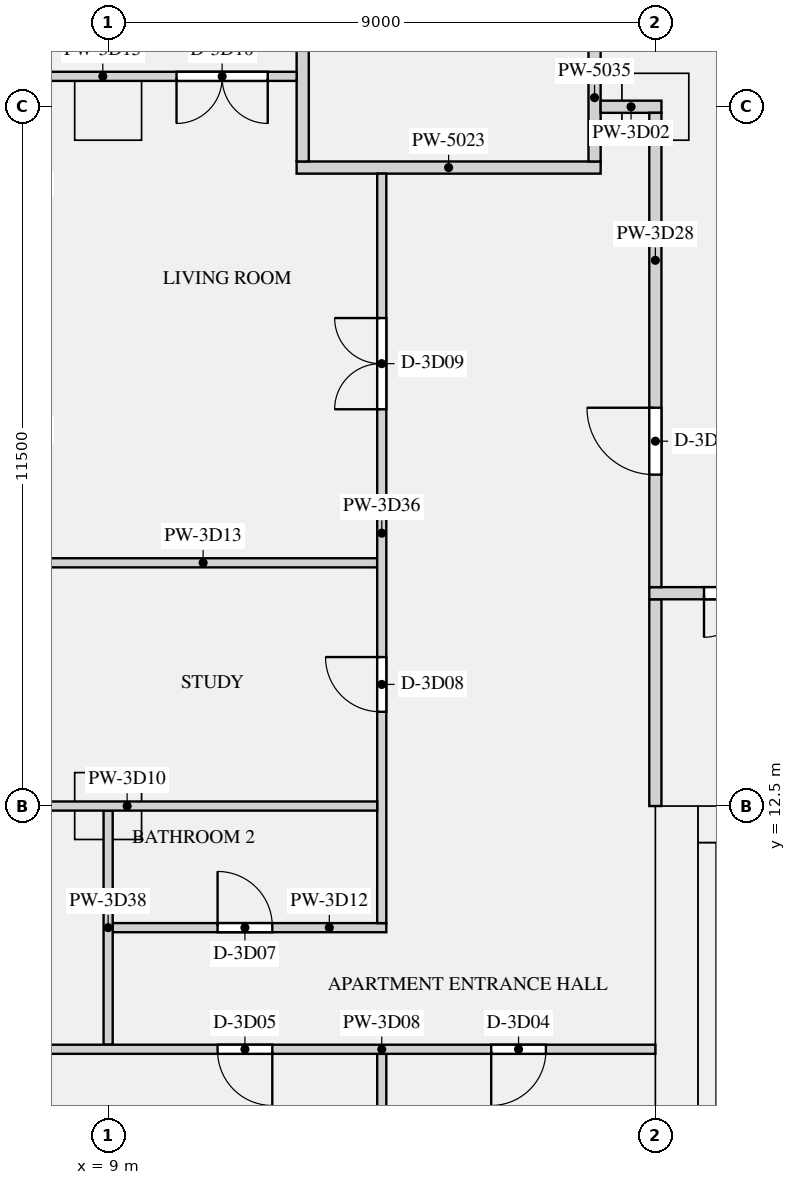
"""IFC4 building model, lengths in metres.
Left out: names, types, materials, properties, quantities, classifications, styles, units other than length and angle.
Written with IfcOpenShell. Run it as: python <this file> out.ifc"""

import sys

from ifc_helpers import new_model, si_unit, direction, frame, frame_2d, origin, origin_2d, place, context, subcontext, project, spatial, rectangle, extrude, element, fill, save


model = new_model("IFC4")
c1 = context("Model", 3, precision=1e-05, world=origin(), true_north=direction((0.0, 1.0)))
c2 = subcontext(c1, "Body", "Model", "MODEL_VIEW")
j1 = project(units=[si_unit("LENGTHUNIT", "METRE"), si_unit("PLANEANGLEUNIT", "RADIAN")], contexts=[c1])
p1 = place(None, origin())
s1 = spatial("IfcSite", under=j1, at=p1, CompositionType="ELEMENT")
p2 = place(p1, origin())
s2 = spatial("IfcBuilding", under=s1, at=p2, CompositionType="ELEMENT")
p3 = place(p2, frame((0.0, 0.0, 166.5)))
s3 = spatial("IfcBuildingStorey", under=s2, at=p3, CompositionType="ELEMENT", Elevation=166.5)
for number, where, z_axis, x_axis in (
    (1, (9.0, 24.0, 0.0), (0.0, 0.0, 1.0), (1.0, 0.0, 0.0)),
    (2, (18.0, 24.0, 0.0), (0.0, 0.0, 1.0), (1.0, 0.0, 0.0)),
    (3, (9.0, 12.5, 0.0), (0.0, 0.0, 1.0), (1.0, 0.0, 0.0)),
):
    element("IfcColumn", number, at=place(p3, frame(where, z_axis=z_axis, x_axis=x_axis)), inside=s3, PredefinedType="COLUMN", context=c2, shape_type="SweptSolid", body=[
        extrude(rectangle(XDim=1.1, YDim=1.1, at=origin_2d()), origin(), (0.0, 0.0, 1.0), 3.15),
    ])
p4 = place(p3, frame((18.35, 0.0, 0.0), z_axis=(0.0, 0.0, 1.0), x_axis=(0.0, 1.0, 0.0)))
e4 = element("IfcWall", 4, at=p4, inside=s3, PredefinedType="SHEAR", context=c2, shape_type="SweptSolid", body=[
    extrude(rectangle(XDim=12.5, YDim=0.7, at=frame_2d((6.25, 0.0))), origin(), (0.0, 0.0, 1.0), 3.15),
])
p5 = place(p3, frame((18.7, 12.2, 0.0), z_axis=(0.0, 0.0, 1.0), x_axis=(1.0, 0.0, 0.0)))
e5 = element("IfcWall", 5, at=p5, inside=s3, PredefinedType="SHEAR", context=c2, shape_type="SweptSolid", body=[
    extrude(rectangle(XDim=34.6, YDim=0.6, at=frame_2d((17.3, 0.0))), origin(), (0.0, 0.0, 1.0), 3.15),
])
p6 = place(p5, frame((24.475, 0.0, 0.0)))
e6 = element("IfcOpeningElement", 6, at=p6, cuts=e5, PredefinedType="OPENING", context=c2, shape_type="SweptSolid", body=[
    extrude(rectangle(XDim=1.1, YDim=2.1, at=frame_2d((0.55, 1.05))), frame((0.0, 0.31, 0.0), z_axis=(0.0, -1.0, 0.0), x_axis=(1.0, 0.0, 0.0)), (0.0, 0.0, 1.0), 0.62),
])
p7 = place(p5, frame((26.725, 0.0, 0.0)))
e7 = element("IfcOpeningElement", 7, at=p7, cuts=e5, PredefinedType="OPENING", context=c2, shape_type="SweptSolid", body=[
    extrude(rectangle(XDim=1.1, YDim=2.1, at=frame_2d((0.55, 1.05))), frame((0.0, 0.31, 0.0), z_axis=(0.0, -1.0, 0.0), x_axis=(1.0, 0.0, 0.0)), (0.0, 0.0, 1.0), 0.62),
])
p8 = place(p5, frame((28.975, 0.0, 0.0)))
e8 = element("IfcOpeningElement", 8, at=p8, cuts=e5, PredefinedType="OPENING", context=c2, shape_type="SweptSolid", body=[
    extrude(rectangle(XDim=1.1, YDim=2.1, at=frame_2d((0.55, 1.05))), frame((0.0, 0.31, 0.0), z_axis=(0.0, -1.0, 0.0), x_axis=(1.0, 0.0, 0.0)), (0.0, 0.0, 1.0), 0.62),
])
p9 = place(p5, frame((8.85, 0.0, 0.0)))
e9 = element("IfcOpeningElement", 9, at=p9, cuts=e5, PredefinedType="OPENING", context=c2, shape_type="SweptSolid", body=[
    extrude(rectangle(XDim=0.9, YDim=2.1, at=frame_2d((0.45, 1.05))), frame((0.0, 0.31, 0.0), z_axis=(0.0, -1.0, 0.0), x_axis=(1.0, 0.0, 0.0)), (0.0, 0.0, 1.0), 0.62),
])
p10 = place(p5, frame((1.45, 0.0, 0.0)))
e10 = element("IfcOpeningElement", 10, at=p10, cuts=e5, PredefinedType="OPENING", context=c2, shape_type="SweptSolid", body=[
    extrude(rectangle(XDim=1.2, YDim=2.1, at=frame_2d((0.6, 1.05))), frame((0.0, 0.31, 0.0), z_axis=(0.0, -1.0, 0.0), x_axis=(1.0, 0.0, 0.0)), (0.0, 0.0, 1.0), 0.62),
])
p11 = place(p5, frame((31.95, 0.0, 0.0)))
e11 = element("IfcOpeningElement", 11, at=p11, cuts=e5, PredefinedType="OPENING", context=c2, shape_type="SweptSolid", body=[
    extrude(rectangle(XDim=1.2, YDim=2.1, at=frame_2d((0.6, 1.05))), frame((0.0, 0.31, 0.0), z_axis=(0.0, -1.0, 0.0), x_axis=(1.0, 0.0, 0.0)), (0.0, 0.0, 1.0), 0.62),
])
p12 = place(p3, frame((18.85, 1.0, 0.0), z_axis=(0.0, 0.0, 1.0), x_axis=(0.0, 1.0, 0.0)))
e12 = element("IfcWall", 12, at=p12, inside=s3, PredefinedType="SHEAR", context=c2, shape_type="SweptSolid", body=[
    extrude(rectangle(XDim=10.9, YDim=0.3, at=frame_2d((5.45, 0.0))), origin(), (0.0, 0.0, 1.0), 3.15),
])
p13 = place(p3, frame((12.1, 23.0, 0.0), z_axis=(0.0, 0.0, 1.0), x_axis=(1.0, 0.0, 0.0)))
e13 = element("IfcWall", 13, at=p13, inside=s3, PredefinedType="PARTITIONING", context=c2, shape_type="SweptSolid", body=[
    extrude(rectangle(XDim=5.0, YDim=0.2, at=frame_2d((2.5, 0.0))), origin(), (0.0, 0.0, 1.0), 2.83),
])
p14 = place(p3, frame((18.0, 12.5, 0.0), z_axis=(0.0, 0.0, 1.0), x_axis=(0.0, 1.0, 0.0)))
e14 = element("IfcWall", 14, at=p14, inside=s3, PredefinedType="PARTITIONING", context=c2, shape_type="SweptSolid", body=[
    extrude(rectangle(XDim=3.4, YDim=0.2, at=frame_2d((1.7, 0.0))), origin(), (0.0, 0.0, 1.0), 2.83),
])
p15 = place(p3, frame((12.2, 23.1, 0.0), z_axis=(0.0, 0.0, 1.0), x_axis=(0.0, 1.0, 0.0)))
e15 = element("IfcWall", 15, at=p15, inside=s3, PredefinedType="PARTITIONING", context=c2, shape_type="SweptSolid", body=[
    extrude(rectangle(XDim=3.9, YDim=0.2, at=frame_2d((1.95, 0.0))), origin(), (0.0, 0.0, 1.0), 2.83),
])
p16 = place(p3, frame((17.0, 23.1, 0.0), z_axis=(0.0, 0.0, 1.0), x_axis=(0.0, 1.0, 0.0)))
e16 = element("IfcWall", 16, at=p16, inside=s3, PredefinedType="PARTITIONING", context=c2, shape_type="SweptSolid", body=[
    extrude(rectangle(XDim=3.8, YDim=0.2, at=frame_2d((1.9, 0.0))), origin(), (0.0, 0.0, 1.0), 2.83),
])
p17 = place(p16, frame((2.1, 0.0, 0.0)))
e17 = element("IfcOpeningElement", 17, at=p17, cuts=e16, PredefinedType="OPENING", context=c2, shape_type="SweptSolid", body=[
    extrude(rectangle(XDim=1.2, YDim=2.1, at=frame_2d((0.6, 1.05))), frame((0.0, 0.11, 0.0), z_axis=(0.0, -1.0, 0.0), x_axis=(1.0, 0.0, 0.0)), (0.0, 0.0, 1.0), 0.22),
])
p18 = place(p3, frame((17.1, 24.0, 0.0), z_axis=(0.0, 0.0, 1.0), x_axis=(1.0, 0.0, 0.0)))
e18 = element("IfcWall", 18, at=p18, inside=s3, PredefinedType="PARTITIONING", context=c2, shape_type="SweptSolid", body=[
    extrude(rectangle(XDim=1.0, YDim=0.2, at=frame_2d((0.5, 0.0))), origin(), (0.0, 0.0, 1.0), 2.83),
])
p19 = place(p3, frame((5.2, 8.5, 0.0), z_axis=(0.0, 0.0, 1.0), x_axis=(1.0, 0.0, 0.0)))
e19 = element("IfcWall", 19, at=p19, inside=s3, PredefinedType="PARTITIONING", context=c2, shape_type="SweptSolid", body=[
    extrude(rectangle(XDim=12.8, YDim=0.15, at=frame_2d((6.4, 0.0))), origin(), (0.0, 0.0, 1.0), 2.83),
])
p20 = place(p19, frame((10.1, 0.0, 0.0)))
e20 = element("IfcOpeningElement", 20, at=p20, cuts=e19, PredefinedType="OPENING", context=c2, shape_type="SweptSolid", body=[
    extrude(rectangle(XDim=0.9, YDim=2.1, at=frame_2d((0.45, 1.05))), frame((0.0, 0.085, 0.0), z_axis=(0.0, -1.0, 0.0), x_axis=(1.0, 0.0, 0.0)), (0.0, 0.0, 1.0), 0.17),
])
p21 = place(p19, frame((5.6, 0.0, 0.0)))
e21 = element("IfcOpeningElement", 21, at=p21, cuts=e19, PredefinedType="OPENING", context=c2, shape_type="SweptSolid", body=[
    extrude(rectangle(XDim=0.9, YDim=2.1, at=frame_2d((0.45, 1.05))), frame((0.0, 0.085, 0.0), z_axis=(0.0, -1.0, 0.0), x_axis=(1.0, 0.0, 0.0)), (0.0, 0.0, 1.0), 0.17),
])
p22 = place(p19, frame((1.375, 0.0, 0.0)))
e22 = element("IfcOpeningElement", 22, at=p22, cuts=e19, PredefinedType="OPENING", context=c2, shape_type="SweptSolid", body=[
    extrude(rectangle(XDim=0.9, YDim=2.1, at=frame_2d((0.45, 1.05))), frame((0.0, 0.085, 0.0), z_axis=(0.0, -1.0, 0.0), x_axis=(1.0, 0.0, 0.0)), (0.0, 0.0, 1.0), 0.17),
])
p23 = place(p3, frame((5.2, 12.5, 0.0), z_axis=(0.0, 0.0, 1.0), x_axis=(1.0, 0.0, 0.0)))
e23 = element("IfcWall", 23, at=p23, inside=s3, PredefinedType="PARTITIONING", context=c2, shape_type="SweptSolid", body=[
    extrude(rectangle(XDim=8.225, YDim=0.15, at=frame_2d((4.113, 0.0))), origin(), (0.0, 0.0, 1.0), 2.83),
])
p24 = place(p3, frame((9.075, 10.5, 0.0), z_axis=(0.0, 0.0, 1.0), x_axis=(1.0, 0.0, 0.0)))
e24 = element("IfcWall", 24, at=p24, inside=s3, PredefinedType="PARTITIONING", context=c2, shape_type="SweptSolid", body=[
    extrude(rectangle(XDim=4.5, YDim=0.15, at=frame_2d((2.25, 0.0))), origin(), (0.0, 0.0, 1.0), 2.83),
])
p25 = place(p24, frame((1.725, 0.0, 0.0)))
e25 = element("IfcOpeningElement", 25, at=p25, cuts=e24, PredefinedType="OPENING", context=c2, shape_type="SweptSolid", body=[
    extrude(rectangle(XDim=0.9, YDim=2.1, at=frame_2d((0.45, 1.05))), frame((0.0, 0.085, 0.0), z_axis=(0.0, -1.0, 0.0), x_axis=(1.0, 0.0, 0.0)), (0.0, 0.0, 1.0), 0.17),
])
p26 = place(p3, frame((7.7, 16.5, 0.0), z_axis=(0.0, 0.0, 1.0), x_axis=(1.0, 0.0, 0.0)))
e26 = element("IfcWall", 26, at=p26, inside=s3, PredefinedType="PARTITIONING", context=c2, shape_type="SweptSolid", body=[
    extrude(rectangle(XDim=5.725, YDim=0.15, at=frame_2d((2.863, 0.0))), origin(), (0.0, 0.0, 1.0), 2.83),
])
p27 = place(p3, frame((7.7, 24.5, 0.0), z_axis=(0.0, 0.0, 1.0), x_axis=(1.0, 0.0, 0.0)))
e27 = element("IfcWall", 27, at=p27, inside=s3, PredefinedType="PARTITIONING", context=c2, shape_type="SweptSolid", body=[
    extrude(rectangle(XDim=4.4, YDim=0.15, at=frame_2d((2.2, 0.0))), origin(), (0.0, 0.0, 1.0), 2.83),
])
p28 = place(p27, frame((2.425, 0.0, 0.0)))
e28 = element("IfcOpeningElement", 28, at=p28, cuts=e27, PredefinedType="OPENING", context=c2, shape_type="SweptSolid", body=[
    extrude(rectangle(XDim=1.5, YDim=2.1, at=frame_2d((0.75, 1.05))), frame((0.0, 0.085, 0.0), z_axis=(0.0, -1.0, 0.0), x_axis=(1.0, 0.0, 0.0)), (0.0, 0.0, 1.0), 0.17),
])
p29 = place(p3, frame((17.9, 16.0, 0.0), z_axis=(0.0, 0.0, 1.0), x_axis=(1.0, 0.0, 0.0)))
e29 = element("IfcWall", 29, at=p29, inside=s3, PredefinedType="PARTITIONING", context=c2, shape_type="SweptSolid", body=[
    extrude(rectangle(XDim=36.2, YDim=0.2, at=frame_2d((18.1, 0.0))), origin(), (0.0, 0.0, 1.0), 2.83),
])
p30 = place(p29, frame((0.9, 0.0, 0.0)))
e30 = element("IfcOpeningElement", 30, at=p30, cuts=e29, PredefinedType="OPENING", context=c2, shape_type="SweptSolid", body=[
    extrude(rectangle(XDim=1.4, YDim=2.1, at=frame_2d((0.7, 1.05))), frame((0.0, 0.11, 0.0), z_axis=(0.0, -1.0, 0.0), x_axis=(1.0, 0.0, 0.0)), (0.0, 0.0, 1.0), 0.22),
])
p31 = place(p29, frame((33.9, 0.0, 0.0)))
e31 = element("IfcOpeningElement", 31, at=p31, cuts=e29, PredefinedType="OPENING", context=c2, shape_type="SweptSolid", body=[
    extrude(rectangle(XDim=1.4, YDim=2.1, at=frame_2d((0.7, 1.05))), frame((0.0, 0.11, 0.0), z_axis=(0.0, -1.0, 0.0), x_axis=(1.0, 0.0, 0.0)), (0.0, 0.0, 1.0), 0.22),
])
p32 = place(p3, frame((18.0, 16.1, 0.0), z_axis=(0.0, 0.0, 1.0), x_axis=(0.0, 1.0, 0.0)))
e32 = element("IfcWall", 32, at=p32, inside=s3, PredefinedType="PARTITIONING", context=c2, shape_type="SweptSolid", body=[
    extrude(rectangle(XDim=7.8, YDim=0.2, at=frame_2d((3.9, 0.0))), origin(), (0.0, 0.0, 1.0), 2.83),
])
p33 = place(p32, frame((1.85, 0.0, 0.0)))
e33 = element("IfcOpeningElement", 33, at=p33, cuts=e32, PredefinedType="OPENING", context=c2, shape_type="SweptSolid", body=[
    extrude(rectangle(XDim=1.1, YDim=2.1, at=frame_2d((0.55, 1.05))), frame((0.0, 0.11, 0.0), z_axis=(0.0, -1.0, 0.0), x_axis=(1.0, 0.0, 0.0)), (0.0, 0.0, 1.0), 0.22),
])
p34 = place(p3, frame((13.5, 0.7, 0.0), z_axis=(0.0, 0.0, 1.0), x_axis=(0.0, 1.0, 0.0)))
e34 = element("IfcWall", 34, at=p34, inside=s3, PredefinedType="PARTITIONING", context=c2, shape_type="SweptSolid", body=[
    extrude(rectangle(XDim=7.725, YDim=0.15, at=frame_2d((3.863, 0.0))), origin(), (0.0, 0.0, 1.0), 2.83),
])
p35 = place(p3, frame((13.5, 10.575, 0.0), z_axis=(0.0, 0.0, 1.0), x_axis=(0.0, 1.0, 0.0)))
e35 = element("IfcWall", 35, at=p35, inside=s3, PredefinedType="PARTITIONING", context=c2, shape_type="SweptSolid", body=[
    extrude(rectangle(XDim=12.325, YDim=0.15, at=frame_2d((6.163, 0.0))), origin(), (0.0, 0.0, 1.0), 2.83),
])
p36 = place(p35, frame((3.475, 0.0, 0.0)))
e36 = element("IfcOpeningElement", 36, at=p36, cuts=e35, PredefinedType="OPENING", context=c2, shape_type="SweptSolid", body=[
    extrude(rectangle(XDim=0.9, YDim=2.1, at=frame_2d((0.45, 1.05))), frame((0.0, 0.085, 0.0), z_axis=(0.0, -1.0, 0.0), x_axis=(1.0, 0.0, 0.0)), (0.0, 0.0, 1.0), 0.17),
])
p37 = place(p35, frame((8.45, 0.0, 0.0)))
e37 = element("IfcOpeningElement", 37, at=p37, cuts=e35, PredefinedType="OPENING", context=c2, shape_type="SweptSolid", body=[
    extrude(rectangle(XDim=1.5, YDim=2.1, at=frame_2d((0.75, 1.05))), frame((0.0, 0.085, 0.0), z_axis=(0.0, -1.0, 0.0), x_axis=(1.0, 0.0, 0.0)), (0.0, 0.0, 1.0), 0.17),
])
p38 = place(p3, frame((9.0, 8.575, 0.0), z_axis=(0.0, 0.0, 1.0), x_axis=(0.0, 1.0, 0.0)))
e38 = element("IfcWall", 38, at=p38, inside=s3, PredefinedType="PARTITIONING", context=c2, shape_type="SweptSolid", body=[
    extrude(rectangle(XDim=3.85, YDim=0.15, at=frame_2d((1.925, 0.0))), origin(), (0.0, 0.0, 1.0), 2.83),
])
p39 = place(p30, frame((1.4, 0.0, 0.0), z_axis=(0.0, 0.0, 1.0), x_axis=(-1.0, 0.0, 0.0)))
e39 = element("IfcDoor", 39, at=p39, inside=s3, OperationType="DOUBLE_DOOR_SINGLE_SWING", PredefinedType="DOOR", context=c2, shape_type="SweptSolid", body=[
    extrude(rectangle(XDim=1.4, YDim=2.1, at=frame_2d((0.7, 1.05))), frame((0.0, 0.025, 0.0), z_axis=(0.0, -1.0, 0.0), x_axis=(1.0, 0.0, 0.0)), (0.0, 0.0, 1.0), 0.05),
])
fill(e30, e39)
p40 = place(p33, origin())
e40 = element("IfcDoor", 40, at=p40, inside=s3, OperationType="SINGLE_SWING_RIGHT", PredefinedType="DOOR", context=c2, shape_type="SweptSolid", body=[
    extrude(rectangle(XDim=1.1, YDim=2.1, at=frame_2d((0.55, 1.05))), frame((0.0, 0.025, 0.0), z_axis=(0.0, -1.0, 0.0), x_axis=(1.0, 0.0, 0.0)), (0.0, 0.0, 1.0), 0.05),
])
fill(e33, e40)
p41 = place(p20, frame((0.9, 0.0, 0.0), z_axis=(0.0, 0.0, 1.0), x_axis=(-1.0, 0.0, 0.0)))
e41 = element("IfcDoor", 41, at=p41, inside=s3, OperationType="SINGLE_SWING_RIGHT", PredefinedType="DOOR", context=c2, shape_type="SweptSolid", body=[
    extrude(rectangle(XDim=0.9, YDim=2.1, at=frame_2d((0.45, 1.05))), frame((0.0, 0.025, 0.0), z_axis=(0.0, -1.0, 0.0), x_axis=(1.0, 0.0, 0.0)), (0.0, 0.0, 1.0), 0.05),
])
fill(e20, e41)
p42 = place(p21, frame((0.9, 0.0, 0.0), z_axis=(0.0, 0.0, 1.0), x_axis=(-1.0, 0.0, 0.0)))
e42 = element("IfcDoor", 42, at=p42, inside=s3, OperationType="SINGLE_SWING_LEFT", PredefinedType="DOOR", context=c2, shape_type="SweptSolid", body=[
    extrude(rectangle(XDim=0.9, YDim=2.1, at=frame_2d((0.45, 1.05))), frame((0.0, 0.025, 0.0), z_axis=(0.0, -1.0, 0.0), x_axis=(1.0, 0.0, 0.0)), (0.0, 0.0, 1.0), 0.05),
])
fill(e21, e42)
p43 = place(p25, origin())
e43 = element("IfcDoor", 43, at=p43, inside=s3, OperationType="SINGLE_SWING_LEFT", PredefinedType="DOOR", context=c2, shape_type="SweptSolid", body=[
    extrude(rectangle(XDim=0.9, YDim=2.1, at=frame_2d((0.45, 1.05))), frame((0.0, 0.025, 0.0), z_axis=(0.0, -1.0, 0.0), x_axis=(1.0, 0.0, 0.0)), (0.0, 0.0, 1.0), 0.05),
])
fill(e25, e43)
p44 = place(p36, origin())
e44 = element("IfcDoor", 44, at=p44, inside=s3, OperationType="SINGLE_SWING_RIGHT", PredefinedType="DOOR", context=c2, shape_type="SweptSolid", body=[
    extrude(rectangle(XDim=0.9, YDim=2.1, at=frame_2d((0.45, 1.05))), frame((0.0, 0.025, 0.0), z_axis=(0.0, -1.0, 0.0), x_axis=(1.0, 0.0, 0.0)), (0.0, 0.0, 1.0), 0.05),
])
fill(e36, e44)
p45 = place(p37, origin())
e45 = element("IfcDoor", 45, at=p45, inside=s3, OperationType="DOUBLE_DOOR_SINGLE_SWING", PredefinedType="DOOR", context=c2, shape_type="SweptSolid", body=[
    extrude(rectangle(XDim=1.5, YDim=2.1, at=frame_2d((0.75, 1.05))), frame((0.0, 0.025, 0.0), z_axis=(0.0, -1.0, 0.0), x_axis=(1.0, 0.0, 0.0)), (0.0, 0.0, 1.0), 0.05),
])
fill(e37, e45)
p46 = place(p28, frame((1.5, 0.0, 0.0), z_axis=(0.0, 0.0, 1.0), x_axis=(-1.0, 0.0, 0.0)))
e46 = element("IfcDoor", 46, at=p46, inside=s3, OperationType="DOUBLE_DOOR_SINGLE_SWING", PredefinedType="DOOR", context=c2, shape_type="SweptSolid", body=[
    extrude(rectangle(XDim=1.5, YDim=2.1, at=frame_2d((0.75, 1.05))), frame((0.0, 0.025, 0.0), z_axis=(0.0, -1.0, 0.0), x_axis=(1.0, 0.0, 0.0)), (0.0, 0.0, 1.0), 0.05),
])
fill(e28, e46)
save(model, sys.argv[1])
